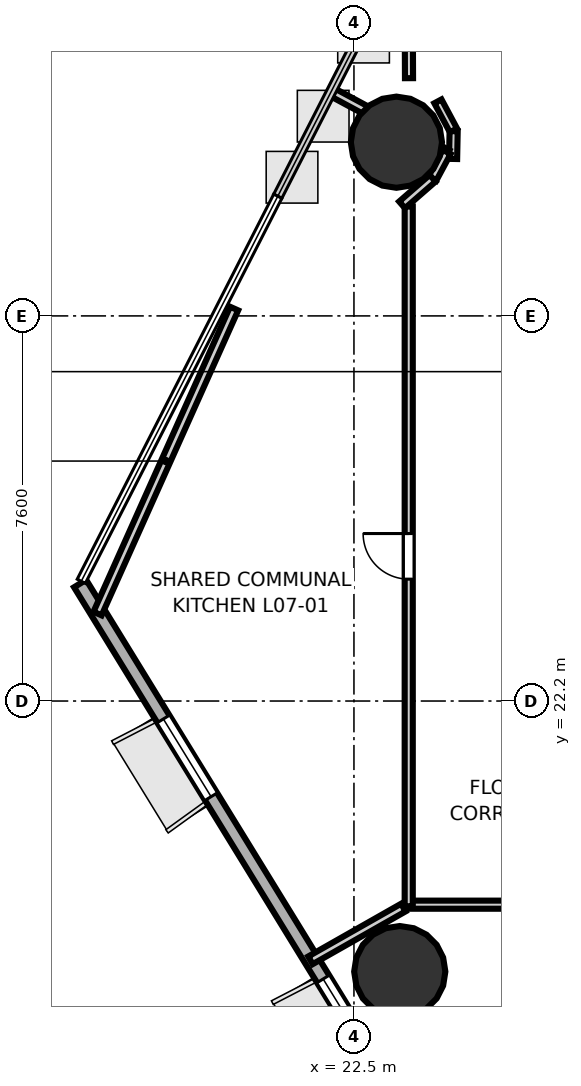
"""IFC4 building model, lengths in metres.
Left out: names, types, materials, properties, quantities, classifications, styles, units other than length and angle.
Written with IfcOpenShell. Run it as: python <this file> out.ifc"""

import sys

from ifc_helpers import new_model, si_unit, direction, frame, frame_2d, origin, origin_2d, place, context, subcontext, project, spatial, rectangle, hollow_circle, extrude, element, fill, save


model = new_model("IFC4")
c1 = context("Model", 3, precision=1e-05, world=origin(), true_north=direction((0.0, 1.0)))
c2 = subcontext(c1, "Body", "Model", "MODEL_VIEW")
j1 = project(units=[si_unit("LENGTHUNIT", "METRE"), si_unit("PLANEANGLEUNIT", "RADIAN")], contexts=[c1])
p1 = place(None, origin())
s1 = spatial("IfcSite", under=j1, at=p1, CompositionType="ELEMENT")
p2 = place(p1, origin())
s2 = spatial("IfcBuilding", under=s1, at=p2, CompositionType="ELEMENT")
p3 = place(p2, frame((0.0, 0.0, 33.1)))
s3 = spatial("IfcBuildingStorey", under=s2, at=p3, CompositionType="ELEMENT", Elevation=33.1)
for number, where, z_axis, x_axis in (
    (1, (23.338, 33.228, 0.0), (0.0, 0.0, 1.0), (1.0, 0.0, 0.0)),
    (2, (23.404, 16.86, 0.0), (0.0, 0.0, 1.0), (1.0, 0.0, 0.0)),
):
    element("IfcColumn", number, at=place(p3, frame(where, z_axis=z_axis, x_axis=x_axis)), inside=s3, PredefinedType="COLUMN", context=c2, shape_type="SweptSolid", body=[
        extrude(hollow_circle(Radius=0.9, WallThickness=0.045, at=origin_2d()), origin(), (0.0, 0.0, 1.0), 3.7),
    ])
p4 = place(p3, frame((17.096, 24.519, 0.0), z_axis=(0.0, 0.0, 1.0), x_axis=(0.523599306322, -0.851964650921, 0.0)))
e3 = element("IfcWall", 3, at=p4, inside=s3, PredefinedType="SOLIDWALL", context=c2, shape_type="SweptSolid", body=[
    extrude(rectangle(XDim=13.457, YDim=0.28, at=frame_2d((6.728, 0.0))), origin(), (0.0, 0.0, 1.0), 3.52),
])
p5 = place(p4, frame((3.137, 0.0, 0.85)))
e4 = element("IfcOpeningElement", 4, at=p5, cuts=e3, PredefinedType="OPENING", context=c2, shape_type="SweptSolid", body=[
    extrude(rectangle(XDim=1.8, YDim=2.1, at=frame_2d((0.9, 1.05))), frame((0.0, 0.15, 0.0), z_axis=(0.0, -1.0, 0.0), x_axis=(1.0, 0.0, 0.0)), (0.0, 0.0, 1.0), 0.3),
])
p6 = place(p4, frame((9.16, 0.0, 0.85)))
e5 = element("IfcOpeningElement", 5, at=p6, cuts=e3, PredefinedType="OPENING", context=c2, shape_type="SweptSolid", body=[
    extrude(rectangle(XDim=1.8, YDim=2.1, at=frame_2d((0.9, 1.05))), frame((0.0, 0.15, 0.0), z_axis=(0.0, -1.0, 0.0), x_axis=(1.0, 0.0, 0.0)), (0.0, 0.0, 1.0), 0.3),
])
p7 = place(p3, frame((24.464, 33.461, 0.0), z_axis=(0.0, 0.0, 1.0), x_axis=(-0.4715232649, 0.881853622014, 0.0)))
e6 = element("IfcWall", 6, at=p7, inside=s3, PredefinedType="PARTITIONING", context=c2, shape_type="SweptSolid", body=[
    extrude(rectangle(XDim=0.65, YDim=0.16, at=frame_2d((0.325, 0.0))), origin(), (0.0, 0.0, 1.0), 2.798),
])
p8 = place(p3, frame((23.587, 34.491, 0.0), z_axis=(0.0, 0.0, 1.0), x_axis=(-0.003825594781, 0.999992682386, 0.0)))
e7 = element("IfcWall", 7, at=p8, inside=s3, PredefinedType="PARTITIONING", context=c2, shape_type="SweptSolid", body=[
    extrude(rectangle(XDim=2.744, YDim=0.16, at=frame_2d((1.372, 0.0))), origin(), (0.0, 0.0, 1.0), 2.84),
])
p9 = place(p3, frame((33.32, 18.181, 0.0), z_axis=(0.0, 0.0, 1.0), x_axis=(-1.0, 0.0, 0.0)))
e8 = element("IfcWall", 8, at=p9, inside=s3, PredefinedType="PARTITIONING", context=c2, shape_type="SweptSolid", body=[
    extrude(rectangle(XDim=9.77, YDim=0.16, at=frame_2d((4.885, 0.0))), origin(), (0.0, 0.0, 1.0), 2.798),
])
p10 = place(p9, frame((5.695, 0.0, 0.0)))
e9 = element("IfcOpeningElement", 9, at=p10, cuts=e8, PredefinedType="OPENING", context=c2, shape_type="SweptSolid", body=[
    extrude(rectangle(XDim=0.9, YDim=2.1, at=frame_2d((0.45, 1.05))), frame((0.0, 0.09, 0.0), z_axis=(0.0, -1.0, 0.0), x_axis=(1.0, 0.0, 0.0)), (0.0, 0.0, 1.0), 0.18),
])
p11 = place(p3, frame((23.581, 18.15, 0.0), z_axis=(0.0, 0.0, 1.0), x_axis=(0.0, 1.0, 0.0)))
e10 = element("IfcWall", 10, at=p11, inside=s3, PredefinedType="PARTITIONING", context=c2, shape_type="SweptSolid", body=[
    extrude(rectangle(XDim=13.81, YDim=0.16, at=frame_2d((6.905, 0.0))), origin(), (0.0, 0.0, 1.0), 2.798),
])
p12 = place(p11, frame((6.455, 0.0, 0.0)))
e11 = element("IfcOpeningElement", 11, at=p12, cuts=e10, PredefinedType="OPENING", context=c2, shape_type="SweptSolid", body=[
    extrude(rectangle(XDim=0.9, YDim=2.1, at=frame_2d((0.45, 1.05))), frame((0.0, 0.09, 0.0), z_axis=(0.0, -1.0, 0.0), x_axis=(1.0, 0.0, 0.0)), (0.0, 0.0, 1.0), 0.18),
])
p13 = place(p3, frame((24.457, 32.897, 0.0), z_axis=(0.0, 0.0, 1.0), x_axis=(0.020031598679, 0.999799347396, 0.0)))
e12 = element("IfcWall", 12, at=p13, inside=s3, PredefinedType="PARTITIONING", context=c2, shape_type="SweptSolid", body=[
    extrude(rectangle(XDim=0.548, YDim=0.16, at=frame_2d((0.274, 0.0))), origin(), (0.0, 0.0, 1.0), 2.84),
])
p14 = place(p3, frame((22.033, 34.236, 0.0), z_axis=(0.0, 0.0, 1.0), x_axis=(0.880677298997, -0.473716682239, 0.0)))
e13 = element("IfcWall", 13, at=p14, inside=s3, PredefinedType="PLUMBINGWALL", context=c2, shape_type="SweptSolid", body=[
    extrude(rectangle(XDim=2.622, YDim=0.175, at=frame_2d((1.311, 0.0))), origin(), (0.0, 0.0, 1.0), 2.798),
])
p15 = place(p3, frame((24.33, 33.036, 0.0), z_axis=(0.0, 0.0, 1.0), x_axis=(-0.473395741492, -0.880849857772, 0.0)))
e14 = element("IfcWall", 14, at=p15, inside=s3, PredefinedType="PLUMBINGWALL", context=c2, shape_type="SweptSolid", body=[
    extrude(rectangle(XDim=0.6, YDim=0.175, at=frame_2d((0.3, 0.0))), origin(), (0.0, 0.0, 1.0), 2.84),
])
p16 = place(p3, frame((24.053, 32.516, 0.0), z_axis=(0.0, 0.0, 1.0), x_axis=(-0.753993768579, -0.656881569953, 0.0)))
e15 = element("IfcWall", 15, at=p16, inside=s3, PredefinedType="PLUMBINGWALL", context=c2, shape_type="SweptSolid", body=[
    extrude(rectangle(XDim=0.8, YDim=0.175, at=frame_2d((0.4, 0.0))), origin(), (0.0, 0.0, 1.0), 2.798),
])
p17 = place(p3, frame((23.475, 18.124, 0.0), z_axis=(0.0, 0.0, 1.0), x_axis=(-0.869707412207, -0.493567641921, 0.0)))
e16 = element("IfcWall", 16, at=p17, inside=s3, PredefinedType="PLUMBINGWALL", context=c2, shape_type="SweptSolid", body=[
    extrude(rectangle(XDim=2.108, YDim=0.175, at=frame_2d((1.054, 0.0))), origin(), (0.0, 0.0, 1.0), 2.798),
])
p18 = place(p3, frame((17.44, 23.926, 0.0), z_axis=(0.0, 0.0, 1.0), x_axis=(0.408664735251, 0.912684575394, 0.0)))
e17 = element("IfcWall", 17, at=p18, inside=s3, PredefinedType="PLUMBINGWALL", context=c2, shape_type="SweptSolid", body=[
    extrude(rectangle(XDim=6.595, YDim=0.175, at=frame_2d((3.298, 0.0))), origin(), (0.0, 0.0, 1.0), 2.84),
])
p19 = place(p12, origin())
e18 = element("IfcDoor", 18, at=p19, inside=s3, OperationType="SINGLE_SWING_RIGHT", PredefinedType="DOOR", context=c2, shape_type="SweptSolid", body=[
    extrude(rectangle(XDim=0.9, YDim=2.1, at=frame_2d((0.45, 1.05))), frame((0.0, 0.025, 0.0), z_axis=(0.0, -1.0, 0.0), x_axis=(1.0, 0.0, 0.0)), (0.0, 0.0, 1.0), 0.05),
])
fill(e11, e18)
p20 = place(p5, origin())
e19 = element("IfcWindow", 19, at=p20, inside=s3, PartitioningType="SINGLE_PANEL", PredefinedType="WINDOW", context=c2, shape_type="SweptSolid", body=[
    extrude(rectangle(XDim=1.8, YDim=2.1, at=frame_2d((0.9, 1.05))), frame((0.0, 0.03, 0.0), z_axis=(0.0, -1.0, 0.0), x_axis=(1.0, 0.0, 0.0)), (0.0, 0.0, 1.0), 0.06),
])
fill(e4, e19)
p21 = place(p6, origin())
e20 = element("IfcWindow", 20, at=p21, inside=s3, PartitioningType="SINGLE_PANEL", PredefinedType="WINDOW", context=c2, shape_type="SweptSolid", body=[
    extrude(rectangle(XDim=1.8, YDim=2.1, at=frame_2d((0.9, 1.05))), frame((0.0, 0.03, 0.0), z_axis=(0.0, -1.0, 0.0), x_axis=(1.0, 0.0, 0.0)), (0.0, 0.0, 1.0), 0.06),
])
fill(e5, e20)
save(model, sys.argv[1])
